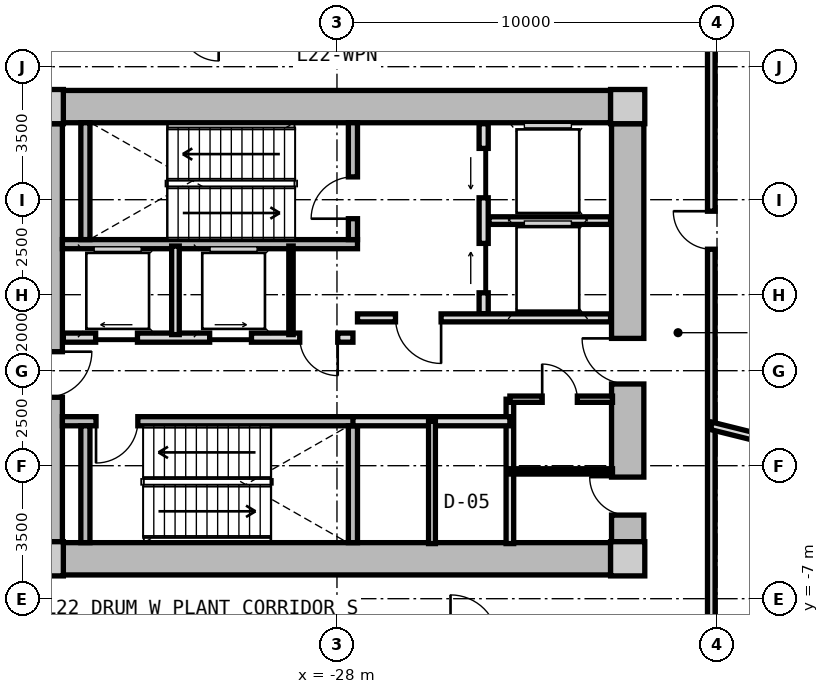
"""IFC4 building model, lengths in metres.
Left out: names, types, materials, properties, quantities, classifications, styles, units other than length and angle.
Written with IfcOpenShell. Run it as: python <this file> out.ifc"""

import sys

from ifc_helpers import new_model, si_unit, direction, frame, frame_2d, origin, origin_2d, place, context, subcontext, project, spatial, rectangle, extrude, source, transform, mapped, element, fill, save


model = new_model("IFC4")
c1 = context("Model", 3, precision=1e-05, world=origin(), true_north=direction((0.0, 1.0)))
c2 = subcontext(c1, "Body", "Model", "MODEL_VIEW")
j1 = project(units=[si_unit("LENGTHUNIT", "METRE"), si_unit("PLANEANGLEUNIT", "RADIAN")], contexts=[c1])
p1 = place(None, origin())
s1 = spatial("IfcSite", under=j1, at=p1, CompositionType="ELEMENT")
p2 = place(p1, origin())
s2 = spatial("IfcBuilding", under=s1, at=p2, CompositionType="ELEMENT")
p3 = place(p2, frame((0.0, 0.0, 73.45)))
s3 = spatial("IfcBuildingStorey", under=s2, at=p3, CompositionType="ELEMENT", Elevation=73.45)
m1 = source(origin(), c2, "Body", "SweptSolid", [
    extrude(rectangle(XDim=0.9, YDim=0.9, at=origin_2d()), origin(), (0.0, 0.0, 1.0), 4.5),
])
for number, where, z_axis, x_axis in (
    (1, (-35.65, -5.95, 0.0), (0.0, 0.0, 1.0), (1.0, 0.0, 0.0)),
    (2, (-20.35, -5.95, 0.0), (0.0, 0.0, 1.0), (1.0, 0.0, 0.0)),
    (3, (-20.35, 5.95, 0.0), (0.0, 0.0, 1.0), (1.0, 0.0, 0.0)),
    (4, (-35.65, 5.95, 0.0), (0.0, 0.0, 1.0), (1.0, 0.0, 0.0)),
):
    element("IfcColumn", number, at=place(p3, frame(where, z_axis=z_axis, x_axis=x_axis)), inside=s3, PredefinedType="COLUMN", context=c2, shape_type="MappedRepresentation", body=[
        mapped(m1, transform((0.0, 0.0, 0.0), x_axis=(1.0, 0.0, 0.0), y_axis=(0.0, 1.0, 0.0), z_axis=(0.0, 0.0, 1.0), scale=1.0)),
    ])
m2 = source(origin(), c2, "Body", "SweptSolid", [
    extrude(rectangle(XDim=14.4, YDim=0.85, at=frame_2d((7.2, 0.0))), origin(), (0.0, 0.0, 1.0), 4.08),
])
for number, where, z_axis, x_axis in (
    (5, (-35.2, 5.95, 0.0), (0.0, 0.0, 1.0), (1.0, 0.0, 0.0)),
    (6, (-20.8, -5.95, 0.0), (0.0, 0.0, 1.0), (-1.0, 0.0, 0.0)),
):
    element("IfcWall", number, at=place(p3, frame(where, z_axis=z_axis, x_axis=x_axis)), inside=s3, PredefinedType="SHEAR", context=c2, shape_type="MappedRepresentation", body=[
        mapped(m2, transform((0.0, 0.0, 0.0), x_axis=(1.0, 0.0, 0.0), y_axis=(0.0, 1.0, 0.0), z_axis=(0.0, 0.0, 1.0), scale=1.0)),
    ])
m3 = source(origin(), c2, "Body", "SweptSolid", [
    extrude(rectangle(XDim=11.0, YDim=0.85, at=frame_2d((5.5, 0.0))), origin(), (0.0, 0.0, 1.0), 4.08),
])
p4 = place(p3, frame((-35.65, -5.5, 0.0), z_axis=(0.0, 0.0, 1.0), x_axis=(0.0, 1.0, 0.0)))
e7 = element("IfcWall", 7, at=p4, inside=s3, PredefinedType="SHEAR", context=c2, shape_type="MappedRepresentation", body=[
    mapped(m3, transform((0.0, 0.0, 0.0), x_axis=(1.0, 0.0, 0.0), y_axis=(0.0, 1.0, 0.0), z_axis=(0.0, 0.0, 1.0), scale=1.0)),
])
p5 = place(p4, frame((3.8, 0.0, 0.0)))
e8 = element("IfcOpeningElement", 8, at=p5, cuts=e7, PredefinedType="OPENING", context=c2, shape_type="SweptSolid", body=[
    extrude(rectangle(XDim=1.2, YDim=2.15, at=frame_2d((0.6, 1.075))), frame((0.0, 0.435, 0.0), z_axis=(0.0, -1.0, 0.0), x_axis=(1.0, 0.0, 0.0)), (0.0, 0.0, 1.0), 0.87),
])
p6 = place(p3, frame((-20.35, 5.5, 0.0), z_axis=(0.0, 0.0, 1.0), x_axis=(0.0, -1.0, 0.0)))
e9 = element("IfcWall", 9, at=p6, inside=s3, PredefinedType="SHEAR", context=c2, shape_type="MappedRepresentation", body=[
    mapped(m3, transform((0.0, 0.0, 0.0), x_axis=(1.0, 0.0, 0.0), y_axis=(0.0, 1.0, 0.0), z_axis=(0.0, 0.0, 1.0), scale=1.0)),
])
p7 = place(p6, frame((5.65, 0.0, 0.0)))
e10 = element("IfcOpeningElement", 10, at=p7, cuts=e9, PredefinedType="OPENING", context=c2, shape_type="SweptSolid", body=[
    extrude(rectangle(XDim=1.2, YDim=2.15, at=frame_2d((0.6, 1.075))), frame((0.0, 0.435, 0.0), z_axis=(0.0, -1.0, 0.0), x_axis=(1.0, 0.0, 0.0)), (0.0, 0.0, 1.0), 0.87),
])
p8 = place(p6, frame((9.3, 0.0, 0.0)))
e11 = element("IfcOpeningElement", 11, at=p8, cuts=e9, PredefinedType="OPENING", context=c2, shape_type="SweptSolid", body=[
    extrude(rectangle(XDim=1.0, YDim=2.1, at=frame_2d((0.5, 1.05))), frame((0.0, 0.435, 0.0), z_axis=(0.0, -1.0, 0.0), x_axis=(1.0, 0.0, 0.0)), (0.0, 0.0, 1.0), 0.87),
])
m4 = source(origin(), c2, "Body", "SweptSolid", [
    extrude(rectangle(XDim=7.765, YDim=0.24, at=frame_2d((3.883, 0.0))), origin(), (0.0, 0.0, 1.0), 4.08),
])
p9 = place(p3, frame((-35.225, 2.33, 0.0), z_axis=(0.0, 0.0, 1.0), x_axis=(1.0, 0.0, 0.0)))
e12 = element("IfcWall", 12, at=p9, inside=s3, PredefinedType="PARTITIONING", context=c2, shape_type="MappedRepresentation", body=[
    mapped(m4, transform((0.0, 0.0, 0.0), x_axis=(1.0, 0.0, 0.0), y_axis=(0.0, 1.0, 0.0), z_axis=(0.0, 0.0, 1.0), scale=1.0)),
])
m5 = source(origin(), c2, "Body", "SweptSolid", [
    extrude(rectangle(XDim=3.075, YDim=0.24, at=frame_2d((1.538, 0.0))), origin(), (0.0, 0.0, 1.0), 4.08),
])
p10 = place(p3, frame((-34.62, 2.45, 0.0), z_axis=(0.0, 0.0, 1.0), x_axis=(0.0, 1.0, 0.0)))
e13 = element("IfcWall", 13, at=p10, inside=s3, PredefinedType="PARTITIONING", context=c2, shape_type="MappedRepresentation", body=[
    mapped(m5, transform((0.0, 0.0, 0.0), x_axis=(1.0, 0.0, 0.0), y_axis=(0.0, 1.0, 0.0), z_axis=(0.0, 0.0, 1.0), scale=1.0)),
])
p11 = place(p3, frame((-27.58, 2.45, 0.0), z_axis=(0.0, 0.0, 1.0), x_axis=(0.0, 1.0, 0.0)))
e14 = element("IfcWall", 14, at=p11, inside=s3, PredefinedType="PARTITIONING", context=c2, shape_type="MappedRepresentation", body=[
    mapped(m5, transform((0.0, 0.0, 0.0), x_axis=(1.0, 0.0, 0.0), y_axis=(0.0, 1.0, 0.0), z_axis=(0.0, 0.0, 1.0), scale=1.0)),
])
p12 = place(p11, frame((0.55, 0.0, 0.0)))
e15 = element("IfcOpeningElement", 15, at=p12, cuts=e14, PredefinedType="OPENING", context=c2, shape_type="SweptSolid", body=[
    extrude(rectangle(XDim=1.1, YDim=2.15, at=frame_2d((0.55, 1.075))), frame((0.0, 0.13, 0.0), z_axis=(0.0, -1.0, 0.0), x_axis=(1.0, 0.0, 0.0)), (0.0, 0.0, 1.0), 0.26),
])
p13 = place(p3, frame((-35.225, -2.33, 0.0), z_axis=(0.0, 0.0, 1.0), x_axis=(1.0, 0.0, 0.0)))
e16 = element("IfcWall", 16, at=p13, inside=s3, PredefinedType="PARTITIONING", context=c2, shape_type="MappedRepresentation", body=[
    mapped(m4, transform((0.0, 0.0, 0.0), x_axis=(1.0, 0.0, 0.0), y_axis=(0.0, 1.0, 0.0), z_axis=(0.0, 0.0, 1.0), scale=1.0)),
])
p14 = place(p13, frame((0.885, 0.0, 0.0)))
e17 = element("IfcOpeningElement", 17, at=p14, cuts=e16, PredefinedType="OPENING", context=c2, shape_type="SweptSolid", body=[
    extrude(rectangle(XDim=1.1, YDim=2.15, at=frame_2d((0.55, 1.075))), frame((0.0, 0.13, 0.0), z_axis=(0.0, -1.0, 0.0), x_axis=(1.0, 0.0, 0.0)), (0.0, 0.0, 1.0), 0.26),
])
for number, where, z_axis, x_axis in (
    (18, (-34.62, -5.525, 0.0), (0.0, 0.0, 1.0), (0.0, 1.0, 0.0)),
    (19, (-27.58, -5.525, 0.0), (0.0, 0.0, 1.0), (0.0, 1.0, 0.0)),
):
    element("IfcWall", number, at=place(p3, frame(where, z_axis=z_axis, x_axis=x_axis)), inside=s3, PredefinedType="PARTITIONING", context=c2, shape_type="MappedRepresentation", body=[
        mapped(m5, transform((0.0, 0.0, 0.0), x_axis=(1.0, 0.0, 0.0), y_axis=(0.0, 1.0, 0.0), z_axis=(0.0, 0.0, 1.0), scale=1.0)),
    ])
m6 = source(origin(), c2, "Body", "SweptSolid", [
    extrude(rectangle(XDim=5.0, YDim=0.24, at=frame_2d((2.5, 0.0))), origin(), (0.0, 0.0, 1.0), 4.065),
])
p15 = place(p3, frame((-24.14, 0.5, 0.0), z_axis=(0.0, 0.0, 1.0), x_axis=(0.0, 1.0, 0.0)))
e20 = element("IfcWall", 20, at=p15, inside=s3, PredefinedType="PARTITIONING", context=c2, shape_type="MappedRepresentation", body=[
    mapped(m6, transform((0.0, 0.0, 0.0), x_axis=(1.0, 0.0, 0.0), y_axis=(0.0, 1.0, 0.0), z_axis=(0.0, 0.0, 1.0), scale=1.0)),
])
p16 = place(p15, frame((3.05, 0.0, 0.0)))
e21 = element("IfcOpeningElement", 21, at=p16, cuts=e20, PredefinedType="OPENING", context=c2, shape_type="SweptSolid", body=[
    extrude(rectangle(XDim=1.3, YDim=2.2, at=frame_2d((0.65, 1.1))), frame((0.0, 0.13, 0.0), z_axis=(0.0, -1.0, 0.0), x_axis=(1.0, 0.0, 0.0)), (0.0, 0.0, 1.0), 0.26),
])
p17 = place(p15, frame((0.55, 0.0, 0.0)))
e22 = element("IfcOpeningElement", 22, at=p17, cuts=e20, PredefinedType="OPENING", context=c2, shape_type="SweptSolid", body=[
    extrude(rectangle(XDim=1.3, YDim=2.2, at=frame_2d((0.65, 1.1))), frame((0.0, 0.13, 0.0), z_axis=(0.0, -1.0, 0.0), x_axis=(1.0, 0.0, 0.0)), (0.0, 0.0, 1.0), 0.26),
])
m7 = source(origin(), c2, "Body", "SweptSolid", [
    extrude(rectangle(XDim=3.2, YDim=0.2, at=frame_2d((1.6, 0.0))), origin(), (0.0, 0.0, 1.0), 4.065),
])
p18 = place(p3, frame((-24.0, 2.95, 0.0), z_axis=(0.0, 0.0, 1.0), x_axis=(1.0, 0.0, 0.0)))
e23 = element("IfcWall", 23, at=p18, inside=s3, PredefinedType="PARTITIONING", context=c2, shape_type="MappedRepresentation", body=[
    mapped(m7, transform((0.0, 0.0, 0.0), x_axis=(1.0, 0.0, 0.0), y_axis=(0.0, 1.0, 0.0), z_axis=(0.0, 0.0, 1.0), scale=1.0)),
])
m8 = source(origin(), c2, "Body", "SweptSolid", [
    extrude(rectangle(XDim=6.66, YDim=0.21, at=frame_2d((3.33, 0.0))), origin(), (0.0, 0.0, 1.0), 4.065),
])
p19 = place(p3, frame((-27.46, 0.39, 0.0), z_axis=(0.0, 0.0, 1.0), x_axis=(1.0, 0.0, 0.0)))
e24 = element("IfcWall", 24, at=p19, inside=s3, PredefinedType="PARTITIONING", context=c2, shape_type="MappedRepresentation", body=[
    mapped(m8, transform((0.0, 0.0, 0.0), x_axis=(1.0, 0.0, 0.0), y_axis=(0.0, 1.0, 0.0), z_axis=(0.0, 0.0, 1.0), scale=1.0)),
])
p20 = place(p19, frame((1.0, 0.0, 0.0)))
e25 = element("IfcOpeningElement", 25, at=p20, cuts=e24, PredefinedType="OPENING", context=c2, shape_type="SweptSolid", body=[
    extrude(rectangle(XDim=1.2, YDim=2.15, at=frame_2d((0.6, 1.075))), frame((0.0, 0.115, 0.0), z_axis=(0.0, -1.0, 0.0), x_axis=(1.0, 0.0, 0.0)), (0.0, 0.0, 1.0), 0.23),
])
m9 = source(origin(), c2, "Body", "SweptSolid", [
    extrude(rectangle(XDim=7.62, YDim=0.24, at=frame_2d((3.81, 0.0))), origin(), (0.0, 0.0, 1.0), 4.065),
])
p21 = place(p3, frame((-35.2, -0.13, 0.0), z_axis=(0.0, 0.0, 1.0), x_axis=(1.0, 0.0, 0.0)))
e26 = element("IfcWall", 26, at=p21, inside=s3, PredefinedType="PARTITIONING", context=c2, shape_type="MappedRepresentation", body=[
    mapped(m9, transform((0.0, 0.0, 0.0), x_axis=(1.0, 0.0, 0.0), y_axis=(0.0, 1.0, 0.0), z_axis=(0.0, 0.0, 1.0), scale=1.0)),
])
p22 = place(p21, frame((6.22, 0.0, 0.0)))
e27 = element("IfcOpeningElement", 27, at=p22, cuts=e26, PredefinedType="OPENING", context=c2, shape_type="SweptSolid", body=[
    extrude(rectangle(XDim=1.0, YDim=2.1, at=frame_2d((0.5, 1.05))), frame((0.0, 0.13, 0.0), z_axis=(0.0, -1.0, 0.0), x_axis=(1.0, 0.0, 0.0)), (0.0, 0.0, 1.0), 0.26),
])
p23 = place(p21, frame((0.85, 0.0, 0.0)))
e28 = element("IfcOpeningElement", 28, at=p23, cuts=e26, PredefinedType="OPENING", context=c2, shape_type="SweptSolid", body=[
    extrude(rectangle(XDim=1.1, YDim=2.2, at=frame_2d((0.55, 1.1))), frame((0.0, 0.13, 0.0), z_axis=(0.0, -1.0, 0.0), x_axis=(1.0, 0.0, 0.0)), (0.0, 0.0, 1.0), 0.26),
])
p24 = place(p21, frame((3.85, 0.0, 0.0)))
e29 = element("IfcOpeningElement", 29, at=p24, cuts=e26, PredefinedType="OPENING", context=c2, shape_type="SweptSolid", body=[
    extrude(rectangle(XDim=1.1, YDim=2.2, at=frame_2d((0.55, 1.1))), frame((0.0, 0.13, 0.0), z_axis=(0.0, -1.0, 0.0), x_axis=(1.0, 0.0, 0.0)), (0.0, 0.0, 1.0), 0.26),
])
m10 = source(origin(), c2, "Body", "SweptSolid", [
    extrude(rectangle(XDim=2.33, YDim=0.115, at=frame_2d((1.165, 0.0))), origin(), (0.0, 0.0, 1.0), 4.065),
])
p25 = place(p3, frame((-29.21, -0.05, 0.0), z_axis=(0.0, 0.0, 1.0), x_axis=(0.0, 1.0, 0.0)))
e30 = element("IfcWall", 30, at=p25, inside=s3, PredefinedType="PARTITIONING", context=c2, shape_type="MappedRepresentation", body=[
    mapped(m10, transform((0.0, 0.0, 0.0), x_axis=(1.0, 0.0, 0.0), y_axis=(0.0, 1.0, 0.0), z_axis=(0.0, 0.0, 1.0), scale=1.0)),
])
m11 = source(origin(), c2, "Body", "SweptSolid", [
    extrude(rectangle(XDim=2.33, YDim=0.2, at=frame_2d((1.165, 0.0))), origin(), (0.0, 0.0, 1.0), 4.065),
])
p26 = place(p3, frame((-32.25, -0.05, 0.0), z_axis=(0.0, 0.0, 1.0), x_axis=(0.0, 1.0, 0.0)))
e31 = element("IfcWall", 31, at=p26, inside=s3, PredefinedType="PARTITIONING", context=c2, shape_type="MappedRepresentation", body=[
    mapped(m11, transform((0.0, 0.0, 0.0), x_axis=(1.0, 0.0, 0.0), y_axis=(0.0, 1.0, 0.0), z_axis=(0.0, 0.0, 1.0), scale=1.0)),
])
m12 = source(origin(), c2, "Body", "SweptSolid", [
    extrude(rectangle(XDim=3.8, YDim=0.2, at=frame_2d((1.9, 0.0))), origin(), (0.0, 0.0, 1.0), 4.065),
])
p27 = place(p3, frame((-23.45, -5.55, 0.0), z_axis=(0.0, 0.0, 1.0), x_axis=(0.0, 1.0, 0.0)))
e32 = element("IfcWall", 32, at=p27, inside=s3, PredefinedType="PARTITIONING", context=c2, shape_type="MappedRepresentation", body=[
    mapped(m12, transform((0.0, 0.0, 0.0), x_axis=(1.0, 0.0, 0.0), y_axis=(0.0, 1.0, 0.0), z_axis=(0.0, 0.0, 1.0), scale=1.0)),
])
m13 = source(origin(), c2, "Body", "SweptSolid", [
    extrude(rectangle(XDim=4.13, YDim=0.24, at=frame_2d((2.065, 0.0))), origin(), (0.0, 0.0, 1.0), 4.065),
])
p28 = place(p3, frame((-27.58, -2.33, 0.0), z_axis=(0.0, 0.0, 1.0), x_axis=(1.0, 0.0, 0.0)))
e33 = element("IfcWall", 33, at=p28, inside=s3, PredefinedType="PARTITIONING", context=c2, shape_type="MappedRepresentation", body=[
    mapped(m13, transform((0.0, 0.0, 0.0), x_axis=(1.0, 0.0, 0.0), y_axis=(0.0, 1.0, 0.0), z_axis=(0.0, 0.0, 1.0), scale=1.0)),
])
m14 = source(origin(), c2, "Body", "SweptSolid", [
    extrude(rectangle(XDim=3.22, YDim=0.18, at=frame_2d((1.61, 0.0))), origin(), (0.0, 0.0, 1.0), 4.065),
])
p29 = place(p3, frame((-25.5, -5.55, 0.0), z_axis=(0.0, 0.0, 1.0), x_axis=(0.0, 1.0, 0.0)))
e34 = element("IfcWall", 34, at=p29, inside=s3, PredefinedType="PARTITIONING", context=c2, shape_type="MappedRepresentation", body=[
    mapped(m14, transform((0.0, 0.0, 0.0), x_axis=(1.0, 0.0, 0.0), y_axis=(0.0, 1.0, 0.0), z_axis=(0.0, 0.0, 1.0), scale=1.0)),
])
m15 = source(origin(), c2, "Body", "SweptSolid", [
    extrude(rectangle(XDim=2.7, YDim=0.165, at=frame_2d((1.35, 0.0))), origin(), (0.0, 0.0, 1.0), 4.065),
])
p30 = place(p3, frame((-23.45, -1.75, 0.0), z_axis=(0.0, 0.0, 1.0), x_axis=(1.0, 0.0, 0.0)))
e35 = element("IfcWall", 35, at=p30, inside=s3, PredefinedType="PARTITIONING", context=c2, shape_type="MappedRepresentation", body=[
    mapped(m15, transform((0.0, 0.0, 0.0), x_axis=(1.0, 0.0, 0.0), y_axis=(0.0, 1.0, 0.0), z_axis=(0.0, 0.0, 1.0), scale=1.0)),
])
p31 = place(p30, frame((0.85, 0.0, 0.0)))
e36 = element("IfcOpeningElement", 36, at=p31, cuts=e35, PredefinedType="OPENING", context=c2, shape_type="SweptSolid", body=[
    extrude(rectangle(XDim=0.925, YDim=2.1, at=frame_2d((0.462, 1.05))), frame((0.0, 0.093, 0.0), z_axis=(0.0, -1.0, 0.0), x_axis=(1.0, 0.0, 0.0)), (0.0, 0.0, 1.0), 0.185),
])
m16 = source(origin(), c2, "Body", "SweptSolid", [
    extrude(rectangle(XDim=2.7, YDim=0.14, at=frame_2d((1.35, 0.0))), origin(), (0.0, 0.0, 1.0), 4.065),
])
p32 = place(p3, frame((-23.45, -3.65, 0.0), z_axis=(0.0, 0.0, 1.0), x_axis=(1.0, 0.0, 0.0)))
e37 = element("IfcWall", 37, at=p32, inside=s3, PredefinedType="PARTITIONING", context=c2, shape_type="MappedRepresentation", body=[
    mapped(m16, transform((0.0, 0.0, 0.0), x_axis=(1.0, 0.0, 0.0), y_axis=(0.0, 1.0, 0.0), z_axis=(0.0, 0.0, 1.0), scale=1.0)),
])
m17 = source(origin(), c2, "Body", "SweptSolid", [
    extrude(rectangle(XDim=16.3, YDim=0.2, at=frame_2d((8.15, 0.0))), origin(), (0.0, 0.0, 1.0), 4.065),
])
p33 = place(p3, frame((-18.15, 8.15, 0.0), z_axis=(0.0, 0.0, 1.0), x_axis=(0.0, -1.0, 0.0)))
e38 = element("IfcWall", 38, at=p33, inside=s3, PredefinedType="PARTITIONING", context=c2, shape_type="MappedRepresentation", body=[
    mapped(m17, transform((0.0, 0.0, 0.0), x_axis=(1.0, 0.0, 0.0), y_axis=(0.0, 1.0, 0.0), z_axis=(0.0, 0.0, 1.0), scale=1.0)),
])
p34 = place(p33, frame((4.953, 0.0, 0.0)))
e39 = element("IfcOpeningElement", 39, at=p34, cuts=e38, PredefinedType="OPENING", context=c2, shape_type="SweptSolid", body=[
    extrude(rectangle(XDim=1.0, YDim=2.1, at=frame_2d((0.5, 1.05))), frame((0.0, 0.11, 0.0), z_axis=(0.0, -1.0, 0.0), x_axis=(1.0, 0.0, 0.0)), (0.0, 0.0, 1.0), 0.22),
])
m18 = source(origin(), c2, "Body", "SweptSolid", [
    extrude(rectangle(XDim=9.459, YDim=0.2, at=frame_2d((4.729, 0.0))), origin(), (0.0, 0.0, 1.0), 2.515),
])
p35 = place(p3, frame((-18.15, -2.452, 0.0), z_axis=(0.0, 0.0, 1.0), x_axis=(0.970390989268, -0.241539495626, 0.0)))
e40 = element("IfcWall", 40, at=p35, inside=s3, PredefinedType="PARTITIONING", context=c2, shape_type="MappedRepresentation", body=[
    mapped(m18, transform((0.0, 0.0, 0.0), x_axis=(1.0, 0.0, 0.0), y_axis=(0.0, 1.0, 0.0), z_axis=(0.0, 0.0, 1.0), scale=1.0)),
])
m19 = source(origin(), c2, "Body", "SweptSolid", [
    extrude(rectangle(XDim=1.1, YDim=2.15, at=frame_2d((0.55, 1.075))), frame((0.0, 0.025, 0.0), z_axis=(0.0, -1.0, 0.0), x_axis=(1.0, 0.0, 0.0)), (0.0, 0.0, 1.0), 0.05),
])
p36 = place(p12, origin())
e41 = element("IfcDoor", 41, at=p36, inside=s3, OperationType="SINGLE_SWING_LEFT", PredefinedType="DOOR", context=c2, shape_type="MappedRepresentation", body=[
    mapped(m19, transform((0.0, 0.0, 0.0), x_axis=(1.0, 0.0, 0.0), y_axis=(0.0, 1.0, 0.0), z_axis=(0.0, 0.0, 1.0), scale=1.0)),
])
fill(e15, e41)
p37 = place(p14, frame((1.1, 0.0, 0.0), z_axis=(0.0, 0.0, 1.0), x_axis=(-1.0, 0.0, 0.0)))
e42 = element("IfcDoor", 42, at=p37, inside=s3, OperationType="SINGLE_SWING_RIGHT", PredefinedType="DOOR", context=c2, shape_type="MappedRepresentation", body=[
    mapped(m19, transform((0.0, 0.0, 0.0), x_axis=(1.0, 0.0, 0.0), y_axis=(0.0, 1.0, 0.0), z_axis=(0.0, 0.0, 1.0), scale=1.0)),
])
fill(e17, e42)
m20 = source(origin(), c2, "Body", "SweptSolid", [
    extrude(rectangle(XDim=1.3, YDim=2.2, at=frame_2d((0.65, 1.1))), frame((0.0, 0.025, 0.0), z_axis=(0.0, -1.0, 0.0), x_axis=(1.0, 0.0, 0.0)), (0.0, 0.0, 1.0), 0.05),
])
p38 = place(p16, origin())
e43 = element("IfcDoor", 43, at=p38, inside=s3, OperationType="SLIDING_TO_LEFT", PredefinedType="DOOR", context=c2, shape_type="MappedRepresentation", body=[
    mapped(m20, transform((0.0, 0.0, 0.0), x_axis=(1.0, 0.0, 0.0), y_axis=(0.0, 1.0, 0.0), z_axis=(0.0, 0.0, 1.0), scale=1.0)),
])
fill(e21, e43)
p39 = place(p17, origin())
e44 = element("IfcDoor", 44, at=p39, inside=s3, OperationType="SLIDING_TO_RIGHT", PredefinedType="DOOR", context=c2, shape_type="MappedRepresentation", body=[
    mapped(m20, transform((0.0, 0.0, 0.0), x_axis=(1.0, 0.0, 0.0), y_axis=(0.0, 1.0, 0.0), z_axis=(0.0, 0.0, 1.0), scale=1.0)),
])
fill(e22, e44)
m21 = source(origin(), c2, "Body", "SweptSolid", [
    extrude(rectangle(XDim=1.2, YDim=2.15, at=frame_2d((0.6, 1.075))), frame((0.0, 0.025, 0.0), z_axis=(0.0, -1.0, 0.0), x_axis=(1.0, 0.0, 0.0)), (0.0, 0.0, 1.0), 0.05),
])
p40 = place(p20, frame((1.2, 0.0, 0.0), z_axis=(0.0, 0.0, 1.0), x_axis=(-1.0, 0.0, 0.0)))
e45 = element("IfcDoor", 45, at=p40, inside=s3, OperationType="SINGLE_SWING_LEFT", PredefinedType="DOOR", context=c2, shape_type="MappedRepresentation", body=[
    mapped(m21, transform((0.0, 0.0, 0.0), x_axis=(1.0, 0.0, 0.0), y_axis=(0.0, 1.0, 0.0), z_axis=(0.0, 0.0, 1.0), scale=1.0)),
])
fill(e25, e45)
p41 = place(p7, frame((1.2, 0.0, 0.0), z_axis=(0.0, 0.0, 1.0), x_axis=(-1.0, 0.0, 0.0)))
e46 = element("IfcDoor", 46, at=p41, inside=s3, OperationType="SINGLE_SWING_RIGHT", PredefinedType="DOOR", context=c2, shape_type="MappedRepresentation", body=[
    mapped(m21, transform((0.0, 0.0, 0.0), x_axis=(1.0, 0.0, 0.0), y_axis=(0.0, 1.0, 0.0), z_axis=(0.0, 0.0, 1.0), scale=1.0)),
])
fill(e10, e46)
m22 = source(origin(), c2, "Body", "SweptSolid", [
    extrude(rectangle(XDim=1.0, YDim=2.1, at=frame_2d((0.5, 1.05))), frame((0.0, 0.025, 0.0), z_axis=(0.0, -1.0, 0.0), x_axis=(1.0, 0.0, 0.0)), (0.0, 0.0, 1.0), 0.05),
])
p42 = place(p22, frame((1.0, 0.0, 0.0), z_axis=(0.0, 0.0, 1.0), x_axis=(-1.0, 0.0, 0.0)))
e47 = element("IfcDoor", 47, at=p42, inside=s3, OperationType="SINGLE_SWING_LEFT", PredefinedType="DOOR", context=c2, shape_type="MappedRepresentation", body=[
    mapped(m22, transform((0.0, 0.0, 0.0), x_axis=(1.0, 0.0, 0.0), y_axis=(0.0, 1.0, 0.0), z_axis=(0.0, 0.0, 1.0), scale=1.0)),
])
fill(e27, e47)
m23 = source(origin(), c2, "Body", "SweptSolid", [
    extrude(rectangle(XDim=1.1, YDim=2.2, at=frame_2d((0.55, 1.1))), frame((0.0, 0.025, 0.0), z_axis=(0.0, -1.0, 0.0), x_axis=(1.0, 0.0, 0.0)), (0.0, 0.0, 1.0), 0.05),
])
p43 = place(p23, origin())
e48 = element("IfcDoor", 48, at=p43, inside=s3, OperationType="SLIDING_TO_LEFT", PredefinedType="DOOR", context=c2, shape_type="MappedRepresentation", body=[
    mapped(m23, transform((0.0, 0.0, 0.0), x_axis=(1.0, 0.0, 0.0), y_axis=(0.0, 1.0, 0.0), z_axis=(0.0, 0.0, 1.0), scale=1.0)),
])
fill(e28, e48)
p44 = place(p24, origin())
e49 = element("IfcDoor", 49, at=p44, inside=s3, OperationType="SLIDING_TO_RIGHT", PredefinedType="DOOR", context=c2, shape_type="MappedRepresentation", body=[
    mapped(m23, transform((0.0, 0.0, 0.0), x_axis=(1.0, 0.0, 0.0), y_axis=(0.0, 1.0, 0.0), z_axis=(0.0, 0.0, 1.0), scale=1.0)),
])
fill(e29, e49)
m24 = source(origin(), c2, "Body", "SweptSolid", [
    extrude(rectangle(XDim=0.925, YDim=2.1, at=frame_2d((0.462, 1.05))), frame((0.0, 0.025, 0.0), z_axis=(0.0, -1.0, 0.0), x_axis=(1.0, 0.0, 0.0)), (0.0, 0.0, 1.0), 0.05),
])
p45 = place(p31, origin())
e50 = element("IfcDoor", 50, at=p45, inside=s3, OperationType="SINGLE_SWING_LEFT", PredefinedType="DOOR", context=c2, shape_type="MappedRepresentation", body=[
    mapped(m24, transform((0.0, 0.0, 0.0), x_axis=(1.0, 0.0, 0.0), y_axis=(0.0, 1.0, 0.0), z_axis=(0.0, 0.0, 1.0), scale=1.0)),
])
fill(e36, e50)
p46 = place(p8, frame((1.0, 0.0, 0.0), z_axis=(0.0, 0.0, 1.0), x_axis=(-1.0, 0.0, 0.0)))
e51 = element("IfcDoor", 51, at=p46, inside=s3, OperationType="SINGLE_SWING_RIGHT", PredefinedType="DOOR", context=c2, shape_type="MappedRepresentation", body=[
    mapped(m22, transform((0.0, 0.0, 0.0), x_axis=(1.0, 0.0, 0.0), y_axis=(0.0, 1.0, 0.0), z_axis=(0.0, 0.0, 1.0), scale=1.0)),
])
fill(e11, e51)
p47 = place(p34, frame((1.0, 0.0, 0.0), z_axis=(0.0, 0.0, 1.0), x_axis=(-1.0, 0.0, 0.0)))
e52 = element("IfcDoor", 52, at=p47, inside=s3, OperationType="SINGLE_SWING_RIGHT", PredefinedType="DOOR", context=c2, shape_type="MappedRepresentation", body=[
    mapped(m22, transform((0.0, 0.0, 0.0), x_axis=(1.0, 0.0, 0.0), y_axis=(0.0, 1.0, 0.0), z_axis=(0.0, 0.0, 1.0), scale=1.0)),
])
fill(e39, e52)
save(model, sys.argv[1])
